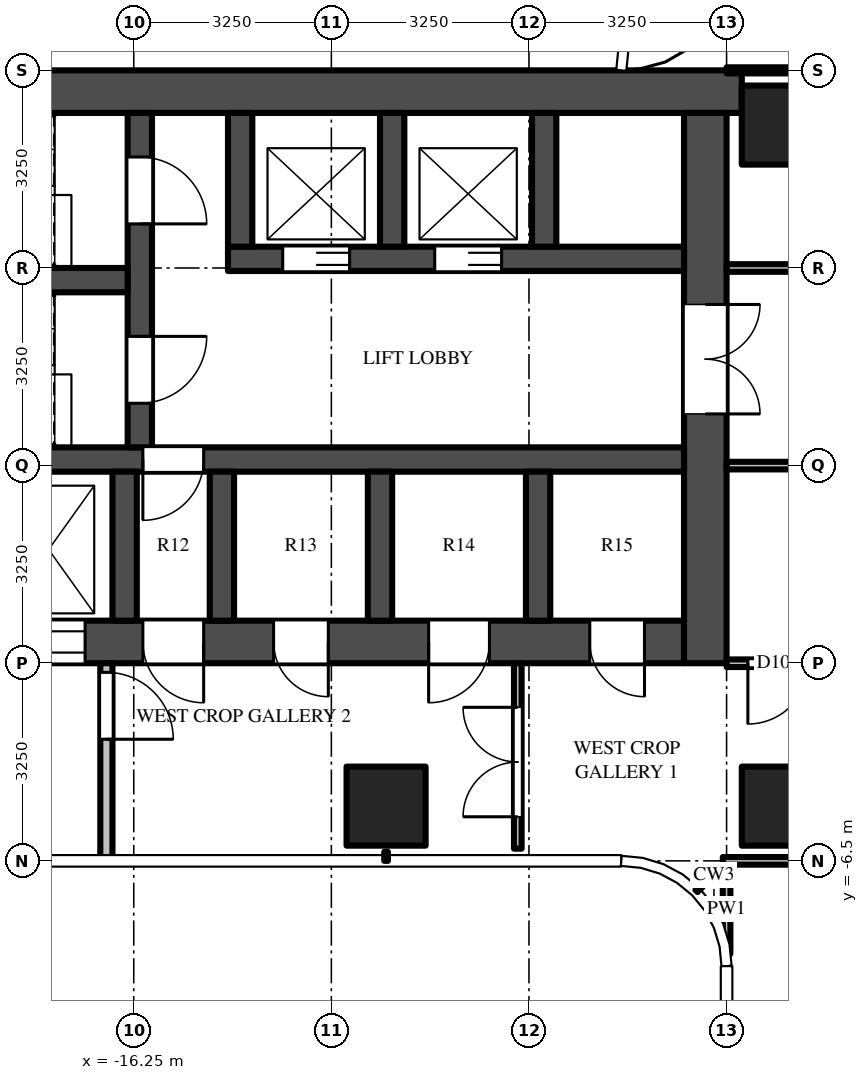
"""IFC4 building model, lengths in metres.
Left out: names, types, materials, properties, quantities, classifications, styles, units other than length and angle.
Written with IfcOpenShell. Run it as: python <this file> out.ifc"""

import sys

from ifc_helpers import new_model, si_unit, direction, frame, frame_2d, origin, origin_2d, place, context, subcontext, project, spatial, rectangle, extrude, source, transform, mapped, element, fill, save


model = new_model("IFC4")
c1 = context("Model", 3, precision=1e-05, world=origin(), true_north=direction((0.0, 1.0)))
c2 = subcontext(c1, "Body", "Model", "MODEL_VIEW")
j1 = project(units=[si_unit("LENGTHUNIT", "METRE"), si_unit("PLANEANGLEUNIT", "RADIAN")], contexts=[c1])
p1 = place(None, origin())
s1 = spatial("IfcSite", under=j1, at=p1, CompositionType="ELEMENT")
p2 = place(p1, origin())
s2 = spatial("IfcBuilding", under=s1, at=p2, CompositionType="ELEMENT")
p3 = place(p2, frame((0.0, 0.0, 124.5)))
s3 = spatial("IfcBuildingStorey", under=s2, at=p3, CompositionType="ELEMENT", Elevation=124.5)
m1 = source(origin(), c2, "Body", "SweptSolid", [
    extrude(rectangle(XDim=1.3, YDim=1.3, at=origin_2d()), origin(), (0.0, 0.0, 1.0), 4.5),
])
for number, where, z_axis, x_axis in (
    (1, (-5.6, 5.6, 0.0), (0.0, 0.0, 1.0), (1.0, 0.0, 0.0)),
    (2, (-5.6, -5.6, 0.0), (0.0, 0.0, 1.0), (1.0, 0.0, 0.0)),
    (3, (-12.1, -5.6, 0.0), (0.0, 0.0, 1.0), (1.0, 0.0, 0.0)),
):
    element("IfcColumn", number, at=place(p3, frame(where, z_axis=z_axis, x_axis=x_axis)), inside=s3, PredefinedType="COLUMN", context=c2, shape_type="MappedRepresentation", body=[
        mapped(m1, transform((0.0, 0.0, 0.0))),
    ])
m2 = source(origin(), c2, "Body", "SweptSolid", [
    extrude(rectangle(XDim=16.5, YDim=0.7, at=frame_2d((8.25, 0.0))), origin(), (0.0, 0.0, 1.0), 4.25),
])
p4 = place(p3, frame((-6.25, 6.15, 0.0), z_axis=(0.0, 0.0, 1.0), x_axis=(-1.0, 0.0, 0.0)))
e4 = element("IfcWall", 4, at=p4, inside=s3, PredefinedType="SHEAR", context=c2, shape_type="MappedRepresentation", body=[
    mapped(m2, transform((0.0, 0.0, 0.0))),
])
m3 = source(origin(), c2, "Body", "SweptSolid", [
    extrude(rectangle(XDim=14.85, YDim=0.7, at=frame_2d((7.425, 0.0))), origin(), (0.0, 0.0, 1.0), 4.25),
])
p5 = place(p3, frame((-7.2, -2.9, 0.0), z_axis=(0.0, 0.0, 1.0), x_axis=(-1.0, 0.0, 0.0)))
e5 = element("IfcWall", 5, at=p5, inside=s3, PredefinedType="SHEAR", context=c2, shape_type="MappedRepresentation", body=[
    mapped(m3, transform((0.0, 0.0, 0.0))),
])
m4 = source(origin(), c2, "Body", "SweptSolid", [
    extrude(rectangle(XDim=1.3, YDim=2.1, at=frame_2d((0.65, 1.05))), frame((0.0, 0.36, 0.0), z_axis=(0.0, -1.0, 0.0), x_axis=(1.0, 0.0, 0.0)), (0.0, 0.0, 1.0), 0.72),
])
p6 = place(p5, frame((12.2, 0.0, 0.0)))
e6 = element("IfcOpeningElement", 6, at=p6, cuts=e5, PredefinedType="OPENING", context=c2, shape_type="MappedRepresentation", body=[
    mapped(m4, transform((0.0, 0.0, 0.0))),
])
m5 = source(origin(), c2, "Body", "SweptSolid", [
    extrude(rectangle(XDim=1.2, YDim=2.1, at=frame_2d((0.6, 1.05))), frame((0.0, 0.36, 0.0), z_axis=(0.0, -1.0, 0.0), x_axis=(1.0, 0.0, 0.0)), (0.0, 0.0, 1.0), 0.72),
])
p7 = place(p5, frame((9.85, 0.0, 0.0)))
e7 = element("IfcOpeningElement", 7, at=p7, cuts=e5, PredefinedType="OPENING", context=c2, shape_type="MappedRepresentation", body=[
    mapped(m5, transform((0.0, 0.0, 0.0))),
])
m6 = source(origin(), c2, "Body", "SweptSolid", [
    extrude(rectangle(XDim=1.0, YDim=2.1, at=frame_2d((0.5, 1.05))), frame((0.0, 0.36, 0.0), z_axis=(0.0, -1.0, 0.0), x_axis=(1.0, 0.0, 0.0)), (0.0, 0.0, 1.0), 0.72),
])
p8 = place(p5, frame((7.9, 0.0, 0.0)))
e8 = element("IfcOpeningElement", 8, at=p8, cuts=e5, PredefinedType="OPENING", context=c2, shape_type="MappedRepresentation", body=[
    mapped(m6, transform((0.0, 0.0, 0.0))),
])
m7 = source(origin(), c2, "Body", "SweptSolid", [
    extrude(rectangle(XDim=0.9, YDim=2.1, at=frame_2d((0.45, 1.05))), frame((0.0, 0.36, 0.0), z_axis=(0.0, -1.0, 0.0), x_axis=(1.0, 0.0, 0.0)), (0.0, 0.0, 1.0), 0.72),
])
p9 = place(p5, frame((0.65, 0.0, 0.0)))
e9 = element("IfcOpeningElement", 9, at=p9, cuts=e5, PredefinedType="OPENING", context=c2, shape_type="MappedRepresentation", body=[
    mapped(m7, transform((0.0, 0.0, 0.0))),
])
p10 = place(p5, frame((3.2, 0.0, 0.0)))
e10 = element("IfcOpeningElement", 10, at=p10, cuts=e5, PredefinedType="OPENING", context=c2, shape_type="MappedRepresentation", body=[
    mapped(m6, transform((0.0, 0.0, 0.0))),
])
p11 = place(p5, frame((5.85, 0.0, 0.0)))
e11 = element("IfcOpeningElement", 11, at=p11, cuts=e5, PredefinedType="OPENING", context=c2, shape_type="MappedRepresentation", body=[
    mapped(m7, transform((0.0, 0.0, 0.0))),
])
m8 = source(origin(), c2, "Body", "SweptSolid", [
    extrude(rectangle(XDim=9.05, YDim=0.7, at=frame_2d((4.525, 0.0))), origin(), (0.0, 0.0, 1.0), 4.25),
])
p12 = place(p3, frame((-6.85, 5.8, 0.0), z_axis=(0.0, 0.0, 1.0), x_axis=(0.0, -1.0, 0.0)))
e12 = element("IfcWall", 12, at=p12, inside=s3, PredefinedType="SHEAR", context=c2, shape_type="MappedRepresentation", body=[
    mapped(m8, transform((0.0, 0.0, 0.0))),
])
m9 = source(origin(), c2, "Body", "SweptSolid", [
    extrude(rectangle(XDim=1.8, YDim=2.1, at=frame_2d((0.9, 1.05))), frame((0.0, 0.36, 0.0), z_axis=(0.0, -1.0, 0.0), x_axis=(1.0, 0.0, 0.0)), (0.0, 0.0, 1.0), 0.72),
])
p13 = place(p12, frame((3.15, 0.0, 0.0)))
e13 = element("IfcOpeningElement", 13, at=p13, cuts=e12, PredefinedType="OPENING", context=c2, shape_type="MappedRepresentation", body=[
    mapped(m9, transform((0.0, 0.0, 0.0))),
])
m10 = source(origin(), c2, "Body", "SweptSolid", [
    extrude(rectangle(XDim=7.5, YDim=0.4, at=frame_2d((3.75, 0.0))), origin(), (0.0, 0.0, 1.0), 4.25),
])
p14 = place(p3, frame((-7.2, 3.4, 0.0), z_axis=(0.0, 0.0, 1.0), x_axis=(-1.0, 0.0, 0.0)))
e14 = element("IfcWall", 14, at=p14, inside=s3, PredefinedType="SHEAR", context=c2, shape_type="MappedRepresentation", body=[
    mapped(m10, transform((0.0, 0.0, 0.0))),
])
m11 = source(origin(), c2, "Body", "SweptSolid", [
    extrude(rectangle(XDim=1.1, YDim=2.1, at=frame_2d((0.55, 1.05))), frame((0.0, 0.21, 0.0), z_axis=(0.0, -1.0, 0.0), x_axis=(1.0, 0.0, 0.0)), (0.0, 0.0, 1.0), 0.42),
])
p15 = place(p14, frame((3.0, 0.0, 0.0)))
e15 = element("IfcOpeningElement", 15, at=p15, cuts=e14, PredefinedType="OPENING", context=c2, shape_type="MappedRepresentation", body=[
    mapped(m11, transform((0.0, 0.0, 0.0))),
])
p16 = place(p14, frame((5.5, 0.0, 0.0)))
e16 = element("IfcOpeningElement", 16, at=p16, cuts=e14, PredefinedType="OPENING", context=c2, shape_type="MappedRepresentation", body=[
    mapped(m11, transform((0.0, 0.0, 0.0))),
])
m12 = source(origin(), c2, "Body", "SweptSolid", [
    extrude(rectangle(XDim=14.85, YDim=0.4, at=frame_2d((7.425, 0.0))), origin(), (0.0, 0.0, 1.0), 4.25),
])
p17 = place(p3, frame((-7.2, 0.1, 0.0), z_axis=(0.0, 0.0, 1.0), x_axis=(-1.0, 0.0, 0.0)))
e17 = element("IfcWall", 17, at=p17, inside=s3, PredefinedType="SHEAR", context=c2, shape_type="MappedRepresentation", body=[
    mapped(m12, transform((0.0, 0.0, 0.0))),
])
m13 = source(origin(), c2, "Body", "SweptSolid", [
    extrude(rectangle(XDim=1.0, YDim=2.1, at=frame_2d((0.5, 1.05))), frame((0.0, 0.21, 0.0), z_axis=(0.0, -1.0, 0.0), x_axis=(1.0, 0.0, 0.0)), (0.0, 0.0, 1.0), 0.42),
])
p18 = place(p17, frame((7.9, 0.0, 0.0)))
e18 = element("IfcOpeningElement", 18, at=p18, cuts=e17, PredefinedType="OPENING", context=c2, shape_type="MappedRepresentation", body=[
    mapped(m13, transform((0.0, 0.0, 0.0))),
])
m14 = source(origin(), c2, "Body", "SweptSolid", [
    extrude(rectangle(XDim=5.5, YDim=0.4, at=frame_2d((2.75, 0.0))), origin(), (0.0, 0.0, 1.0), 4.25),
])
p19 = place(p3, frame((-16.15, 5.8, 0.0), z_axis=(0.0, 0.0, 1.0), x_axis=(0.0, -1.0, 0.0)))
e19 = element("IfcWall", 19, at=p19, inside=s3, PredefinedType="SHEAR", context=c2, shape_type="MappedRepresentation", body=[
    mapped(m14, transform((0.0, 0.0, 0.0))),
])
p20 = place(p19, frame((0.725, 0.0, 0.0)))
e20 = element("IfcOpeningElement", 20, at=p20, cuts=e19, PredefinedType="OPENING", context=c2, shape_type="MappedRepresentation", body=[
    mapped(m11, transform((0.0, 0.0, 0.0))),
])
p21 = place(p19, frame((3.675, 0.0, 0.0)))
e21 = element("IfcOpeningElement", 21, at=p21, cuts=e19, PredefinedType="OPENING", context=c2, shape_type="MappedRepresentation", body=[
    mapped(m11, transform((0.0, 0.0, 0.0))),
])
m15 = source(origin(), c2, "Body", "SweptSolid", [
    extrude(rectangle(XDim=5.7, YDim=0.4, at=frame_2d((2.85, 0.0))), origin(), (0.0, 0.0, 1.0), 4.25),
])
p22 = place(p3, frame((-16.35, 3.05, 0.0), z_axis=(0.0, 0.0, 1.0), x_axis=(-1.0, 0.0, 0.0)))
e22 = element("IfcWall", 22, at=p22, inside=s3, PredefinedType="SHEAR", context=c2, shape_type="MappedRepresentation", body=[
    mapped(m15, transform((0.0, 0.0, 0.0))),
])
m16 = source(origin(), c2, "Body", "SweptSolid", [
    extrude(rectangle(XDim=2.2, YDim=0.4, at=frame_2d((1.1, 0.0))), origin(), (0.0, 0.0, 1.0), 4.25),
])
for number, where, z_axis, x_axis in (
    (23, (-9.5, 5.8, 0.0), (0.0, 0.0, 1.0), (0.0, -1.0, 0.0)),
    (24, (-12.0, 5.8, 0.0), (0.0, 0.0, 1.0), (0.0, -1.0, 0.0)),
    (25, (-14.5, 5.8, 0.0), (0.0, 0.0, 1.0), (0.0, -1.0, 0.0)),
):
    element("IfcWall", number, at=place(p3, frame(where, z_axis=z_axis, x_axis=x_axis)), inside=s3, PredefinedType="SHEAR", context=c2, shape_type="MappedRepresentation", body=[
        mapped(m16, transform((0.0, 0.0, 0.0))),
    ])
m17 = source(origin(), c2, "Body", "SweptSolid", [
    extrude(rectangle(XDim=2.45, YDim=0.4, at=frame_2d((1.225, 0.0))), origin(), (0.0, 0.0, 1.0), 4.25),
])
for number, where, z_axis, x_axis in (
    (26, (-9.6, -0.1, 0.0), (0.0, 0.0, 1.0), (0.0, -1.0, 0.0)),
    (27, (-12.2, -0.1, 0.0), (0.0, 0.0, 1.0), (0.0, -1.0, 0.0)),
    (28, (-14.8, -0.1, 0.0), (0.0, 0.0, 1.0), (0.0, -1.0, 0.0)),
    (29, (-16.4, -0.1, 0.0), (0.0, 0.0, 1.0), (0.0, -1.0, 0.0)),
):
    element("IfcWall", number, at=place(p3, frame(where, z_axis=z_axis, x_axis=x_axis)), inside=s3, PredefinedType="SHEAR", context=c2, shape_type="MappedRepresentation", body=[
        mapped(m17, transform((0.0, 0.0, 0.0))),
    ])
m18 = source(origin(), c2, "Body", "SweptSolid", [
    extrude(rectangle(XDim=3.25, YDim=0.2, at=frame_2d((1.625, 0.0))), origin(), (0.0, 0.0, 1.0), 4.25),
])
p23 = place(p3, frame((-16.7, -3.25, 0.0), z_axis=(0.0, 0.0, 1.0), x_axis=(0.0, -1.0, 0.0)))
e30 = element("IfcWall", 30, at=p23, inside=s3, PredefinedType="PARTITIONING", context=c2, shape_type="MappedRepresentation", body=[
    mapped(m18, transform((0.0, 0.0, 0.0))),
])
m19 = source(origin(), c2, "Body", "SweptSolid", [
    extrude(rectangle(XDim=1.1, YDim=2.1, at=frame_2d((0.55, 1.05))), frame((0.0, 0.11, 0.0), z_axis=(0.0, -1.0, 0.0), x_axis=(1.0, 0.0, 0.0)), (0.0, 0.0, 1.0), 0.22),
])
p24 = place(p23, frame((0.15, 0.0, 0.0)))
e31 = element("IfcOpeningElement", 31, at=p24, cuts=e30, PredefinedType="OPENING", context=c2, shape_type="MappedRepresentation", body=[
    mapped(m19, transform((0.0, 0.0, 0.0))),
])
m20 = source(origin(), c2, "Body", "SweptSolid", [
    extrude(rectangle(XDim=3.05, YDim=0.125, at=frame_2d((1.525, 0.0))), origin(), (0.0, 0.0, 1.0), 3.33),
])
p25 = place(p3, frame((-9.934, -6.3, 0.0), z_axis=(0.0, 0.0, 1.0), x_axis=(0.0, 1.0, 0.0)))
e32 = element("IfcWall", 32, at=p25, inside=s3, PredefinedType="PARTITIONING", context=c2, shape_type="MappedRepresentation", body=[
    mapped(m20, transform((0.0, 0.0, 0.0))),
])
m21 = source(origin(), c2, "Body", "SweptSolid", [
    extrude(rectangle(XDim=1.8, YDim=2.1, at=frame_2d((0.9, 1.05))), frame((0.0, 0.073, 0.0), z_axis=(0.0, -1.0, 0.0), x_axis=(1.0, 0.0, 0.0)), (0.0, 0.0, 1.0), 0.145),
])
p26 = place(p25, frame((0.525, 0.0, 0.0)))
e33 = element("IfcOpeningElement", 33, at=p26, cuts=e32, PredefinedType="OPENING", context=c2, shape_type="MappedRepresentation", body=[
    mapped(m21, transform((0.0, 0.0, 0.0))),
])
m22 = source(origin(), c2, "Body", "SweptSolid", [
    extrude(rectangle(XDim=1.469, YDim=0.125, at=frame_2d((0.734, 0.0))), origin(), (0.0, 0.0, 1.0), 4.25),
])
p27 = place(p3, frame((-6.5, -6.562, 0.0), z_axis=(0.0, 0.0, 1.0), x_axis=(0.0, -1.0, 0.0)))
e34 = element("IfcWall", 34, at=p27, inside=s3, PredefinedType="PARTITIONING", context=c2, shape_type="MappedRepresentation", body=[
    mapped(m22, transform((0.0, 0.0, 0.0))),
])
m23 = source(origin(), c2, "Body", "SweptSolid", [
    extrude(rectangle(XDim=3.725, YDim=0.125, at=frame_2d((1.863, 0.0))), origin(), (0.0, 0.0, 1.0), 3.33),
])
p28 = place(p3, frame((-2.837, -6.5, 0.0), z_axis=(0.0, 0.0, 1.0), x_axis=(-1.0, 0.0, 0.0)))
e35 = element("IfcWall", 35, at=p28, inside=s3, PredefinedType="PARTITIONING", context=c2, shape_type="MappedRepresentation", body=[
    mapped(m23, transform((0.0, 0.0, 0.0))),
])
m24 = source(origin(), c2, "Body", "SweptSolid", [
    extrude(rectangle(XDim=5.363, YDim=0.125, at=frame_2d((2.681, 0.0))), origin(), (0.0, 0.0, 1.0), 3.468),
])
p29 = place(p3, frame((-1.137, -3.25, 0.0), z_axis=(0.0, 0.0, 1.0), x_axis=(-1.0, 0.0, 0.0)))
e36 = element("IfcWall", 36, at=p29, inside=s3, PredefinedType="PARTITIONING", context=c2, shape_type="MappedRepresentation", body=[
    mapped(m24, transform((0.0, 0.0, 0.0))),
])
m25 = source(origin(), c2, "Body", "SweptSolid", [
    extrude(rectangle(XDim=1.0, YDim=2.1, at=frame_2d((0.5, 1.05))), frame((0.0, 0.073, 0.0), z_axis=(0.0, -1.0, 0.0), x_axis=(1.0, 0.0, 0.0)), (0.0, 0.0, 1.0), 0.145),
])
p30 = place(p29, frame((4.012, 0.0, 0.0)))
e37 = element("IfcOpeningElement", 37, at=p30, cuts=e36, PredefinedType="OPENING", context=c2, shape_type="MappedRepresentation", body=[
    mapped(m25, transform((0.0, 0.0, 0.0))),
])
p31 = place(p3, frame((-1.137, 0.0, 0.0), z_axis=(0.0, 0.0, 1.0), x_axis=(-1.0, 0.0, 0.0)))
e38 = element("IfcWall", 38, at=p31, inside=s3, PredefinedType="PARTITIONING", context=c2, shape_type="MappedRepresentation", body=[
    mapped(m24, transform((0.0, 0.0, 0.0))),
])
p32 = place(p3, frame((-6.5, 3.25, 0.0), z_axis=(0.0, 0.0, 1.0), x_axis=(1.0, 0.0, 0.0)))
e39 = element("IfcWall", 39, at=p32, inside=s3, PredefinedType="PARTITIONING", context=c2, shape_type="MappedRepresentation", body=[
    mapped(m24, transform((0.0, 0.0, 0.0))),
])
p33 = place(p32, frame((3.95, 0.0, 0.0)))
e40 = element("IfcOpeningElement", 40, at=p33, cuts=e39, PredefinedType="OPENING", context=c2, shape_type="MappedRepresentation", body=[
    mapped(m25, transform((0.0, 0.0, 0.0))),
])
m26 = source(origin(), c2, "Body", "SweptSolid", [
    extrude(rectangle(XDim=5.363, YDim=0.1, at=frame_2d((2.681, 0.0))), origin(), (0.0, 0.0, 1.0), 3.33),
])
p34 = place(p3, frame((-6.5, 6.5, 0.0), z_axis=(0.0, 0.0, 1.0), x_axis=(1.0, 0.0, 0.0)))
e41 = element("IfcWall", 41, at=p34, inside=s3, PredefinedType="PARTITIONING", context=c2, shape_type="MappedRepresentation", body=[
    mapped(m26, transform((0.0, 0.0, 0.0))),
])
m27 = source(origin(), c2, "Body", "SweptSolid", [
    extrude(rectangle(XDim=1.1, YDim=2.1, at=frame_2d((0.55, 1.05))), frame((0.0, 0.025, 0.0), z_axis=(0.0, -1.0, 0.0), x_axis=(1.0, 0.0, 0.0)), (0.0, 0.0, 1.0), 0.05),
])
p35 = place(p15, origin())
e42 = element("IfcDoor", 42, at=p35, inside=s3, OperationType="DOUBLE_DOOR_SLIDING", PredefinedType="DOOR", context=c2, shape_type="MappedRepresentation", body=[
    mapped(m27, transform((0.0, 0.0, 0.0))),
])
fill(e15, e42)
p36 = place(p16, origin())
e43 = element("IfcDoor", 43, at=p36, inside=s3, OperationType="DOUBLE_DOOR_SLIDING", PredefinedType="DOOR", context=c2, shape_type="MappedRepresentation", body=[
    mapped(m27, transform((0.0, 0.0, 0.0))),
])
fill(e16, e43)
m28 = source(origin(), c2, "Body", "SweptSolid", [
    extrude(rectangle(XDim=1.2, YDim=2.1, at=frame_2d((0.6, 1.05))), frame((0.0, -0.275, 0.0), z_axis=(0.0, -1.0, 0.0), x_axis=(1.0, 0.0, 0.0)), (0.0, 0.0, 1.0), 0.05),
])
p37 = place(p7, origin())
e44 = element("IfcDoor", 44, at=p37, inside=s3, OperationType="DOUBLE_DOOR_SLIDING", PredefinedType="DOOR", context=c2, shape_type="MappedRepresentation", body=[
    mapped(m28, transform((0.0, 0.0, 0.0))),
])
fill(e7, e44)
m29 = source(origin(), c2, "Body", "SweptSolid", [
    extrude(rectangle(XDim=1.8, YDim=2.1, at=frame_2d((0.9, 1.05))), frame((0.0, -0.275, 0.0), z_axis=(0.0, -1.0, 0.0), x_axis=(1.0, 0.0, 0.0)), (0.0, 0.0, 1.0), 0.05),
])
p38 = place(p13, origin())
e45 = element("IfcDoor", 45, at=p38, inside=s3, OperationType="DOUBLE_DOOR_SINGLE_SWING", PredefinedType="DOOR", context=c2, shape_type="MappedRepresentation", body=[
    mapped(m29, transform((0.0, 0.0, 0.0))),
])
fill(e13, e45)
p39 = place(p20, origin())
e46 = element("IfcDoor", 46, at=p39, inside=s3, OperationType="SINGLE_SWING_RIGHT", PredefinedType="DOOR", context=c2, shape_type="MappedRepresentation", body=[
    mapped(m27, transform((0.0, 0.0, 0.0))),
])
fill(e20, e46)
p40 = place(p21, origin())
e47 = element("IfcDoor", 47, at=p40, inside=s3, OperationType="SINGLE_SWING_LEFT", PredefinedType="DOOR", context=c2, shape_type="MappedRepresentation", body=[
    mapped(m27, transform((0.0, 0.0, 0.0))),
])
fill(e21, e47)
m30 = source(origin(), c2, "Body", "SweptSolid", [
    extrude(rectangle(XDim=1.0, YDim=2.1, at=frame_2d((0.5, 1.05))), frame((0.0, 0.025, 0.0), z_axis=(0.0, -1.0, 0.0), x_axis=(1.0, 0.0, 0.0)), (0.0, 0.0, 1.0), 0.05),
])
p41 = place(p18, origin())
e48 = element("IfcDoor", 48, at=p41, inside=s3, OperationType="SINGLE_SWING_RIGHT", PredefinedType="DOOR", context=c2, shape_type="MappedRepresentation", body=[
    mapped(m30, transform((0.0, 0.0, 0.0))),
])
fill(e18, e48)
m31 = source(origin(), c2, "Body", "SweptSolid", [
    extrude(rectangle(XDim=1.0, YDim=2.1, at=frame_2d((0.5, 1.05))), frame((0.0, -0.275, 0.0), z_axis=(0.0, -1.0, 0.0), x_axis=(1.0, 0.0, 0.0)), (0.0, 0.0, 1.0), 0.05),
])
p42 = place(p8, origin())
e49 = element("IfcDoor", 49, at=p42, inside=s3, OperationType="SINGLE_SWING_LEFT", PredefinedType="DOOR", context=c2, shape_type="MappedRepresentation", body=[
    mapped(m31, transform((0.0, 0.0, 0.0))),
])
fill(e8, e49)
p43 = place(p24, origin())
e50 = element("IfcDoor", 50, at=p43, inside=s3, OperationType="SINGLE_SWING_RIGHT", PredefinedType="DOOR", context=c2, shape_type="MappedRepresentation", body=[
    mapped(m27, transform((0.0, 0.0, 0.0))),
])
fill(e31, e50)
m32 = source(origin(), c2, "Body", "SweptSolid", [
    extrude(rectangle(XDim=0.9, YDim=2.1, at=frame_2d((0.45, 1.05))), frame((0.0, -0.275, 0.0), z_axis=(0.0, -1.0, 0.0), x_axis=(1.0, 0.0, 0.0)), (0.0, 0.0, 1.0), 0.05),
])
p44 = place(p9, origin())
e51 = element("IfcDoor", 51, at=p44, inside=s3, OperationType="SINGLE_SWING_LEFT", PredefinedType="DOOR", context=c2, shape_type="MappedRepresentation", body=[
    mapped(m32, transform((0.0, 0.0, 0.0))),
])
fill(e9, e51)
p45 = place(p10, origin())
e52 = element("IfcDoor", 52, at=p45, inside=s3, OperationType="SINGLE_SWING_RIGHT", PredefinedType="DOOR", context=c2, shape_type="MappedRepresentation", body=[
    mapped(m31, transform((0.0, 0.0, 0.0))),
])
fill(e10, e52)
p46 = place(p11, origin())
e53 = element("IfcDoor", 53, at=p46, inside=s3, OperationType="SINGLE_SWING_LEFT", PredefinedType="DOOR", context=c2, shape_type="MappedRepresentation", body=[
    mapped(m32, transform((0.0, 0.0, 0.0))),
])
fill(e11, e53)
m33 = source(origin(), c2, "Body", "SweptSolid", [
    extrude(rectangle(XDim=1.8, YDim=2.1, at=frame_2d((0.9, 1.05))), frame((0.0, 0.025, 0.0), z_axis=(0.0, -1.0, 0.0), x_axis=(1.0, 0.0, 0.0)), (0.0, 0.0, 1.0), 0.05),
])
p47 = place(p26, origin())
e54 = element("IfcDoor", 54, at=p47, inside=s3, OperationType="DOUBLE_DOOR_SINGLE_SWING", PredefinedType="DOOR", context=c2, shape_type="MappedRepresentation", body=[
    mapped(m33, transform((0.0, 0.0, 0.0))),
])
fill(e33, e54)
p48 = place(p30, origin())
e55 = element("IfcDoor", 55, at=p48, inside=s3, OperationType="SINGLE_SWING_RIGHT", PredefinedType="DOOR", context=c2, shape_type="MappedRepresentation", body=[
    mapped(m30, transform((0.0, 0.0, 0.0))),
])
fill(e37, e55)
save(model, sys.argv[1])
